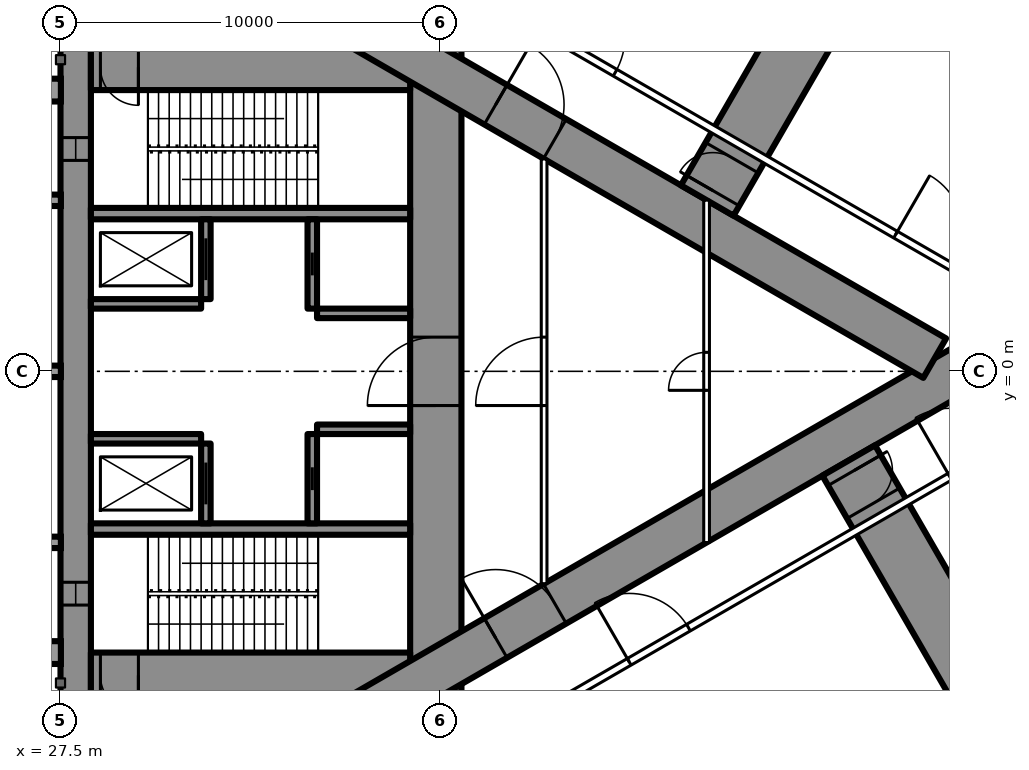
"""IFC4 building model, lengths in metres.
Left out: names, types, materials, properties, quantities, classifications, styles, units other than length and angle.
Written with IfcOpenShell. Run it as: python <this file> out.ifc"""

import sys

from ifc_helpers import new_model, si_unit, direction, frame, frame_2d, origin, place, context, subcontext, project, spatial, rectangle, extrude, element, fill, save


model = new_model("IFC4")
c1 = context("Model", 3, precision=1e-05, world=origin(), true_north=direction((0.0, 1.0)))
c2 = subcontext(c1, "Body", "Model", "MODEL_VIEW")
j1 = project(units=[si_unit("LENGTHUNIT", "METRE"), si_unit("PLANEANGLEUNIT", "RADIAN")], contexts=[c1])
p1 = place(None, origin())
s1 = spatial("IfcSite", under=j1, at=p1, CompositionType="ELEMENT")
p2 = place(p1, origin())
s2 = spatial("IfcBuilding", under=s1, at=p2, CompositionType="ELEMENT")
p3 = place(p2, frame((0.0, 0.0, 81.0)))
s3 = spatial("IfcBuildingStorey", under=s2, at=p3, CompositionType="ELEMENT", Elevation=81.0)
p4 = place(p3, frame((27.9, -8.6, 0.0), z_axis=(0.0, 0.0, 1.0), x_axis=(0.0, 1.0, 0.0)))
e1 = element("IfcWall", 1, at=p4, inside=s3, PredefinedType="SHEAR", context=c2, shape_type="SweptSolid", body=[
    extrude(rectangle(XDim=17.2, YDim=0.8, at=frame_2d((8.6, 0.0))), origin(), (0.0, 0.0, 1.0), 6.0),
])
p5 = place(p4, frame((2.45, 0.0, 0.6)))
e2 = element("IfcOpeningElement", 2, at=p5, cuts=e1, PredefinedType="OPENING", context=c2, shape_type="SweptSolid", body=[
    extrude(rectangle(XDim=0.6, YDim=4.5, at=frame_2d((0.3, 2.25))), frame((0.0, 0.41, 0.0), z_axis=(0.0, -1.0, 0.0), x_axis=(1.0, 0.0, 0.0)), (0.0, 0.0, 1.0), 0.82),
])
p6 = place(p4, frame((14.15, 0.0, 0.6)))
e3 = element("IfcOpeningElement", 3, at=p6, cuts=e1, PredefinedType="OPENING", context=c2, shape_type="SweptSolid", body=[
    extrude(rectangle(XDim=0.6, YDim=4.5, at=frame_2d((0.3, 2.25))), frame((0.0, 0.41, 0.0), z_axis=(0.0, -1.0, 0.0), x_axis=(1.0, 0.0, 0.0)), (0.0, 0.0, 1.0), 0.82),
])
p7 = place(p3, frame((37.375, -8.6, 0.0), z_axis=(0.0, 0.0, 1.0), x_axis=(0.0, 1.0, 0.0)))
e4 = element("IfcWall", 4, at=p7, inside=s3, PredefinedType="SHEAR", context=c2, shape_type="SweptSolid", body=[
    extrude(rectangle(XDim=17.2, YDim=1.35, at=frame_2d((8.6, 0.0))), origin(), (0.0, 0.0, 1.0), 6.0),
])
p8 = place(p7, frame((7.7, 0.0, 0.0)))
e5 = element("IfcOpeningElement", 5, at=p8, cuts=e4, PredefinedType="OPENING", context=c2, shape_type="SweptSolid", body=[
    extrude(rectangle(XDim=1.8, YDim=2.2, at=frame_2d((0.9, 1.1))), frame((0.0, 0.685, 0.0), z_axis=(0.0, -1.0, 0.0), x_axis=(1.0, 0.0, 0.0)), (0.0, 0.0, 1.0), 1.37),
])
p9 = place(p3, frame((28.3, -8.0, 0.0), z_axis=(0.0, 0.0, 1.0), x_axis=(1.0, 0.0, 0.0)))
e6 = element("IfcWall", 6, at=p9, inside=s3, PredefinedType="SHEAR", context=c2, shape_type="SweptSolid", body=[
    extrude(rectangle(XDim=8.4, YDim=1.2, at=frame_2d((4.2, 0.0))), origin(), (0.0, 0.0, 1.0), 6.0),
])
p10 = place(p9, frame((0.25, 0.0, 0.0)))
e7 = element("IfcOpeningElement", 7, at=p10, cuts=e6, PredefinedType="OPENING", context=c2, shape_type="SweptSolid", body=[
    extrude(rectangle(XDim=1.0, YDim=2.2, at=frame_2d((0.5, 1.1))), frame((0.0, 0.61, 0.0), z_axis=(0.0, -1.0, 0.0), x_axis=(1.0, 0.0, 0.0)), (0.0, 0.0, 1.0), 1.22),
])
p11 = place(p3, frame((28.3, 8.0, 0.0), z_axis=(0.0, 0.0, 1.0), x_axis=(1.0, 0.0, 0.0)))
e8 = element("IfcWall", 8, at=p11, inside=s3, PredefinedType="SHEAR", context=c2, shape_type="SweptSolid", body=[
    extrude(rectangle(XDim=8.4, YDim=1.2, at=frame_2d((4.2, 0.0))), origin(), (0.0, 0.0, 1.0), 6.0),
])
p12 = place(p11, frame((0.25, 0.0, 0.0)))
e9 = element("IfcOpeningElement", 9, at=p12, cuts=e8, PredefinedType="OPENING", context=c2, shape_type="SweptSolid", body=[
    extrude(rectangle(XDim=1.0, YDim=2.2, at=frame_2d((0.5, 1.1))), frame((0.0, 0.61, 0.0), z_axis=(0.0, -1.0, 0.0), x_axis=(1.0, 0.0, 0.0)), (0.0, 0.0, 1.0), 1.22),
])
for number, where, z_axis, x_axis in (
    (10, (28.3, -4.15, 0.0), (0.0, 0.0, 1.0), (1.0, 0.0, 0.0)),
    (11, (28.3, 4.15, 0.0), (0.0, 0.0, 1.0), (1.0, 0.0, 0.0)),
):
    element("IfcWall", number, at=place(p3, frame(where, z_axis=z_axis, x_axis=x_axis)), inside=s3, PredefinedType="SHEAR", context=c2, shape_type="SweptSolid", body=[
        extrude(rectangle(XDim=8.4, YDim=0.3, at=frame_2d((4.2, 0.0))), origin(), (0.0, 0.0, 1.0), 6.0),
    ])
p13 = place(p3, frame((31.325, -4.0, 0.0), z_axis=(0.0, 0.0, 1.0), x_axis=(0.0, 1.0, 0.0)))
e12 = element("IfcWall", 12, at=p13, inside=s3, PredefinedType="SHEAR", context=c2, shape_type="SweptSolid", body=[
    extrude(rectangle(XDim=2.1, YDim=0.25, at=frame_2d((1.05, 0.0))), origin(), (0.0, 0.0, 1.0), 6.0),
])
p14 = place(p13, frame((0.5, 0.0, 0.0)))
e13 = element("IfcOpeningElement", 13, at=p14, cuts=e12, PredefinedType="OPENING", context=c2, shape_type="SweptSolid", body=[
    extrude(rectangle(XDim=1.1, YDim=2.2, at=frame_2d((0.55, 1.1))), frame((0.0, 0.135, 0.0), z_axis=(0.0, -1.0, 0.0), x_axis=(1.0, 0.0, 0.0)), (0.0, 0.0, 1.0), 0.27),
])
p15 = place(p3, frame((34.125, -4.0, 0.0), z_axis=(0.0, 0.0, 1.0), x_axis=(0.0, 1.0, 0.0)))
e14 = element("IfcWall", 14, at=p15, inside=s3, PredefinedType="SHEAR", context=c2, shape_type="SweptSolid", body=[
    extrude(rectangle(XDim=2.35, YDim=0.25, at=frame_2d((1.175, 0.0))), origin(), (0.0, 0.0, 1.0), 6.0),
])
p16 = place(p15, frame((0.875, 0.0, 0.0)))
e15 = element("IfcOpeningElement", 15, at=p16, cuts=e14, PredefinedType="OPENING", context=c2, shape_type="SweptSolid", body=[
    extrude(rectangle(XDim=0.6, YDim=2.0, at=frame_2d((0.3, 1.0))), frame((0.0, 0.135, 0.0), z_axis=(0.0, -1.0, 0.0), x_axis=(1.0, 0.0, 0.0)), (0.0, 0.0, 1.0), 0.27),
])
p17 = place(p3, frame((28.3, -1.775, 0.0), z_axis=(0.0, 0.0, 1.0), x_axis=(1.0, 0.0, 0.0)))
e16 = element("IfcWall", 16, at=p17, inside=s3, PredefinedType="SHEAR", context=c2, shape_type="SweptSolid", body=[
    extrude(rectangle(XDim=2.9, YDim=0.25, at=frame_2d((1.45, 0.0))), origin(), (0.0, 0.0, 1.0), 6.0),
])
p18 = place(p3, frame((34.25, -1.525, 0.0), z_axis=(0.0, 0.0, 1.0), x_axis=(1.0, 0.0, 0.0)))
e17 = element("IfcWall", 17, at=p18, inside=s3, PredefinedType="SHEAR", context=c2, shape_type="SweptSolid", body=[
    extrude(rectangle(XDim=2.45, YDim=0.25, at=frame_2d((1.225, 0.0))), origin(), (0.0, 0.0, 1.0), 6.0),
])
p19 = place(p3, frame((31.325, 1.9, 0.0), z_axis=(0.0, 0.0, 1.0), x_axis=(0.0, 1.0, 0.0)))
e18 = element("IfcWall", 18, at=p19, inside=s3, PredefinedType="SHEAR", context=c2, shape_type="SweptSolid", body=[
    extrude(rectangle(XDim=2.1, YDim=0.25, at=frame_2d((1.05, 0.0))), origin(), (0.0, 0.0, 1.0), 6.0),
])
p20 = place(p19, frame((0.5, 0.0, 0.0)))
e19 = element("IfcOpeningElement", 19, at=p20, cuts=e18, PredefinedType="OPENING", context=c2, shape_type="SweptSolid", body=[
    extrude(rectangle(XDim=1.1, YDim=2.2, at=frame_2d((0.55, 1.1))), frame((0.0, 0.135, 0.0), z_axis=(0.0, -1.0, 0.0), x_axis=(1.0, 0.0, 0.0)), (0.0, 0.0, 1.0), 0.27),
])
p21 = place(p3, frame((34.125, 1.65, 0.0), z_axis=(0.0, 0.0, 1.0), x_axis=(0.0, 1.0, 0.0)))
e20 = element("IfcWall", 20, at=p21, inside=s3, PredefinedType="SHEAR", context=c2, shape_type="SweptSolid", body=[
    extrude(rectangle(XDim=2.35, YDim=0.25, at=frame_2d((1.175, 0.0))), origin(), (0.0, 0.0, 1.0), 6.0),
])
p22 = place(p21, frame((0.875, 0.0, 0.0)))
e21 = element("IfcOpeningElement", 21, at=p22, cuts=e20, PredefinedType="OPENING", context=c2, shape_type="SweptSolid", body=[
    extrude(rectangle(XDim=0.6, YDim=2.0, at=frame_2d((0.3, 1.0))), frame((0.0, 0.135, 0.0), z_axis=(0.0, -1.0, 0.0), x_axis=(1.0, 0.0, 0.0)), (0.0, 0.0, 1.0), 0.27),
])
p23 = place(p3, frame((28.3, 1.775, 0.0), z_axis=(0.0, 0.0, 1.0), x_axis=(1.0, 0.0, 0.0)))
e22 = element("IfcWall", 22, at=p23, inside=s3, PredefinedType="SHEAR", context=c2, shape_type="SweptSolid", body=[
    extrude(rectangle(XDim=2.9, YDim=0.25, at=frame_2d((1.45, 0.0))), origin(), (0.0, 0.0, 1.0), 6.0),
])
p24 = place(p3, frame((34.25, 1.525, 0.0), z_axis=(0.0, 0.0, 1.0), x_axis=(1.0, 0.0, 0.0)))
e23 = element("IfcWall", 23, at=p24, inside=s3, PredefinedType="SHEAR", context=c2, shape_type="SweptSolid", body=[
    extrude(rectangle(XDim=2.45, YDim=0.25, at=frame_2d((1.225, 0.0))), origin(), (0.0, 0.0, 1.0), 6.0),
])
p25 = place(p3, frame((27.2, -13.8, 0.0), z_axis=(0.0, 0.0, 1.0), x_axis=(0.866027159892, 0.499996958321, 0.0)))
e24 = element("IfcWall", 24, at=p25, inside=s3, PredefinedType="SHEAR", context=c2, shape_type="SweptSolid", body=[
    extrude(rectangle(XDim=27.947, YDim=1.2, at=frame_2d((13.973, 0.0))), origin(), (0.0, 0.0, 1.0), 6.0),
])
p26 = place(p25, frame((4.6, 0.0, 0.0)))
e25 = element("IfcOpeningElement", 25, at=p26, cuts=e24, PredefinedType="OPENING", context=c2, shape_type="SweptSolid", body=[
    extrude(rectangle(XDim=1.0, YDim=2.2, at=frame_2d((0.5, 1.1))), frame((0.0, 0.61, 0.0), z_axis=(0.0, -1.0, 0.0), x_axis=(1.0, 0.0, 0.0)), (0.0, 0.0, 1.0), 1.22),
])
p27 = place(p25, frame((13.568, 0.0, 0.0)))
e26 = element("IfcOpeningElement", 26, at=p27, cuts=e24, PredefinedType="OPENING", context=c2, shape_type="SweptSolid", body=[
    extrude(rectangle(XDim=1.8, YDim=2.2, at=frame_2d((0.9, 1.1))), frame((0.0, 0.61, 0.0), z_axis=(0.0, -1.0, 0.0), x_axis=(1.0, 0.0, 0.0)), (0.0, 0.0, 1.0), 1.22),
])
p28 = place(p3, frame((27.2, 13.8, 0.0), z_axis=(0.0, 0.0, 1.0), x_axis=(0.866024515034, -0.500001539357, 0.0)))
e27 = element("IfcWall", 27, at=p28, inside=s3, PredefinedType="SHEAR", context=c2, shape_type="SweptSolid", body=[
    extrude(rectangle(XDim=26.907, YDim=1.2, at=frame_2d((13.454, 0.0))), origin(), (0.0, 0.0, 1.0), 6.0),
])
p29 = place(p28, frame((4.6, 0.0, 0.0)))
e28 = element("IfcOpeningElement", 28, at=p29, cuts=e27, PredefinedType="OPENING", context=c2, shape_type="SweptSolid", body=[
    extrude(rectangle(XDim=1.0, YDim=2.2, at=frame_2d((0.5, 1.1))), frame((0.0, 0.61, 0.0), z_axis=(0.0, -1.0, 0.0), x_axis=(1.0, 0.0, 0.0)), (0.0, 0.0, 1.0), 1.22),
])
p30 = place(p28, frame((13.568, 0.0, 0.0)))
e29 = element("IfcOpeningElement", 29, at=p30, cuts=e27, PredefinedType="OPENING", context=c2, shape_type="SweptSolid", body=[
    extrude(rectangle(XDim=1.8, YDim=2.2, at=frame_2d((0.9, 1.1))), frame((0.0, 0.61, 0.0), z_axis=(0.0, -1.0, 0.0), x_axis=(1.0, 0.0, 0.0)), (0.0, 0.0, 1.0), 1.22),
])
p31 = place(p3, frame((48.239, -2.346, 0.0), z_axis=(0.0, 0.0, 1.0), x_axis=(0.500006130383, -0.866021864377, 0.0)))
e30 = element("IfcWall", 30, at=p31, inside=s3, PredefinedType="SHEAR", context=c2, shape_type="SweptSolid", body=[
    extrude(rectangle(XDim=13.112, YDim=1.6, at=frame_2d((6.556, 0.0))), origin(), (0.0, 0.0, 1.0), 6.0),
])
p32 = place(p31, frame((0.3, 0.0, 0.0)))
e31 = element("IfcOpeningElement", 31, at=p32, cuts=e30, PredefinedType="OPENING", context=c2, shape_type="SweptSolid", body=[
    extrude(rectangle(XDim=1.0, YDim=2.2, at=frame_2d((0.5, 1.1))), frame((0.0, 0.81, 0.0), z_axis=(0.0, -1.0, 0.0), x_axis=(1.0, 0.0, 0.0)), (0.0, 0.0, 1.0), 1.62),
])
p33 = place(p3, frame((44.517, 4.495, 0.0), z_axis=(0.0, 0.0, 1.0), x_axis=(0.500003233568, 0.866023536875, 0.0)))
e32 = element("IfcWall", 32, at=p33, inside=s3, PredefinedType="SHEAR", context=c2, shape_type="SweptSolid", body=[
    extrude(rectangle(XDim=13.122, YDim=1.6, at=frame_2d((6.561, 0.0))), origin(), (0.0, 0.0, 1.0), 6.0),
])
p34 = place(p33, frame((0.3, 0.0, 0.0)))
e33 = element("IfcOpeningElement", 33, at=p34, cuts=e32, PredefinedType="OPENING", context=c2, shape_type="SweptSolid", body=[
    extrude(rectangle(XDim=1.0, YDim=2.2, at=frame_2d((0.5, 1.1))), frame((0.0, 0.81, 0.0), z_axis=(0.0, -1.0, 0.0), x_axis=(1.0, 0.0, 0.0)), (0.0, 0.0, 1.0), 1.62),
])
p35 = place(p3, frame((37.96, -10.243, 0.0), z_axis=(0.0, 0.0, 1.0), x_axis=(0.866026429433, 0.499998223521, 0.0)))
e34 = element("IfcWall", 34, at=p35, inside=s3, PredefinedType="PARTITIONING", context=c2, shape_type="SweptSolid", body=[
    extrude(rectangle(XDim=20.487, YDim=0.2, at=frame_2d((10.243, 0.0))), origin(), (0.0, 0.0, 1.0), 5.75),
])
p36 = place(p35, frame((14.943, 0.0, 0.0)))
e35 = element("IfcOpeningElement", 35, at=p36, cuts=e34, PredefinedType="OPENING", context=c2, shape_type="SweptSolid", body=[
    extrude(rectangle(XDim=1.8, YDim=2.2, at=frame_2d((0.9, 1.1))), frame((0.0, 0.11, 0.0), z_axis=(0.0, -1.0, 0.0), x_axis=(1.0, 0.0, 0.0)), (0.0, 0.0, 1.0), 0.22),
])
p37 = place(p35, frame((5.2, 0.0, 0.0)))
e36 = element("IfcOpeningElement", 36, at=p37, cuts=e34, PredefinedType="OPENING", context=c2, shape_type="SweptSolid", body=[
    extrude(rectangle(XDim=1.8, YDim=2.2, at=frame_2d((0.9, 1.1))), frame((0.0, 0.11, 0.0), z_axis=(0.0, -1.0, 0.0), x_axis=(1.0, 0.0, 0.0)), (0.0, 0.0, 1.0), 0.22),
])
p38 = place(p3, frame((36.834, 10.894, 0.0), z_axis=(0.0, 0.0, 1.0), x_axis=(0.866028157229, -0.499995230863, 0.0)))
e37 = element("IfcWall", 37, at=p38, inside=s3, PredefinedType="PARTITIONING", context=c2, shape_type="SweptSolid", body=[
    extrude(rectangle(XDim=21.667, YDim=0.2, at=frame_2d((10.833, 0.0))), origin(), (0.0, 0.0, 1.0), 5.75),
])
p39 = place(p38, frame((14.594, 0.0, 0.0)))
e38 = element("IfcOpeningElement", 38, at=p39, cuts=e37, PredefinedType="OPENING", context=c2, shape_type="SweptSolid", body=[
    extrude(rectangle(XDim=1.8, YDim=2.2, at=frame_2d((0.9, 1.1))), frame((0.0, 0.11, 0.0), z_axis=(0.0, -1.0, 0.0), x_axis=(1.0, 0.0, 0.0)), (0.0, 0.0, 1.0), 0.22),
])
p40 = place(p38, frame((4.073, 0.0, 0.0)))
e39 = element("IfcOpeningElement", 39, at=p40, cuts=e37, PredefinedType="OPENING", context=c2, shape_type="SweptSolid", body=[
    extrude(rectangle(XDim=2.0, YDim=2.4, at=frame_2d((1.0, 1.2))), frame((0.0, 0.11, 0.0), z_axis=(0.0, -1.0, 0.0), x_axis=(1.0, 0.0, 0.0)), (0.0, 0.0, 1.0), 0.22),
])
p41 = place(p3, frame((40.225, -5.587, 0.0), z_axis=(0.0, 0.0, 1.0), x_axis=(0.0, 1.0, 0.0)))
e40 = element("IfcWall", 40, at=p41, inside=s3, PredefinedType="PARTITIONING", context=c2, shape_type="SweptSolid", body=[
    extrude(rectangle(XDim=11.174, YDim=0.15, at=frame_2d((5.587, 0.0))), origin(), (0.0, 0.0, 1.0), 5.75),
])
p42 = place(p41, frame((4.687, 0.0, 0.0)))
e41 = element("IfcOpeningElement", 41, at=p42, cuts=e40, PredefinedType="OPENING", context=c2, shape_type="SweptSolid", body=[
    extrude(rectangle(XDim=1.8, YDim=2.2, at=frame_2d((0.9, 1.1))), frame((0.0, 0.085, 0.0), z_axis=(0.0, -1.0, 0.0), x_axis=(1.0, 0.0, 0.0)), (0.0, 0.0, 1.0), 0.17),
])
p43 = place(p3, frame((44.5, -4.505, 0.0), z_axis=(0.0, 0.0, 1.0), x_axis=(0.0, 1.0, 0.0)))
e42 = element("IfcWall", 42, at=p43, inside=s3, PredefinedType="PARTITIONING", context=c2, shape_type="SweptSolid", body=[
    extrude(rectangle(XDim=9.009, YDim=0.15, at=frame_2d((4.505, 0.0))), origin(), (0.0, 0.0, 1.0), 5.75),
])
p44 = place(p43, frame((4.005, 0.0, 0.0)))
e43 = element("IfcOpeningElement", 43, at=p44, cuts=e42, PredefinedType="OPENING", context=c2, shape_type="SweptSolid", body=[
    extrude(rectangle(XDim=1.0, YDim=2.2, at=frame_2d((0.5, 1.1))), frame((0.0, 0.085, 0.0), z_axis=(0.0, -1.0, 0.0), x_axis=(1.0, 0.0, 0.0)), (0.0, 0.0, 1.0), 0.17),
])
p45 = place(p32, origin())
e44 = element("IfcDoor", 44, at=p45, inside=s3, OperationType="SINGLE_SWING_LEFT", PredefinedType="DOOR", context=c2, shape_type="SweptSolid", body=[
    extrude(rectangle(XDim=1.0, YDim=2.2, at=frame_2d((0.5, 1.1))), frame((0.0, 0.025, 0.0), z_axis=(0.0, -1.0, 0.0), x_axis=(1.0, 0.0, 0.0)), (0.0, 0.0, 1.0), 0.05),
])
fill(e31, e44)
p46 = place(p34, origin())
e45 = element("IfcDoor", 45, at=p46, inside=s3, OperationType="SINGLE_SWING_LEFT", PredefinedType="DOOR", context=c2, shape_type="SweptSolid", body=[
    extrude(rectangle(XDim=1.0, YDim=2.2, at=frame_2d((0.5, 1.1))), frame((0.0, 0.025, 0.0), z_axis=(0.0, -1.0, 0.0), x_axis=(1.0, 0.0, 0.0)), (0.0, 0.0, 1.0), 0.05),
])
fill(e33, e45)
p47 = place(p36, origin())
e46 = element("IfcDoor", 46, at=p47, inside=s3, OperationType="DOUBLE_DOOR_SINGLE_SWING", PredefinedType="DOOR", context=c2, shape_type="SweptSolid", body=[
    extrude(rectangle(XDim=1.8, YDim=2.2, at=frame_2d((0.9, 1.1))), frame((0.0, 0.025, 0.0), z_axis=(0.0, -1.0, 0.0), x_axis=(1.0, 0.0, 0.0)), (0.0, 0.0, 1.0), 0.05),
])
fill(e35, e46)
p48 = place(p39, origin())
e47 = element("IfcDoor", 47, at=p48, inside=s3, OperationType="DOUBLE_DOOR_SINGLE_SWING", PredefinedType="DOOR", context=c2, shape_type="SweptSolid", body=[
    extrude(rectangle(XDim=1.8, YDim=2.2, at=frame_2d((0.9, 1.1))), frame((0.0, 0.025, 0.0), z_axis=(0.0, -1.0, 0.0), x_axis=(1.0, 0.0, 0.0)), (0.0, 0.0, 1.0), 0.05),
])
fill(e38, e47)
p49 = place(p40, origin())
e48 = element("IfcDoor", 48, at=p49, inside=s3, OperationType="DOUBLE_DOOR_SINGLE_SWING", PredefinedType="DOOR", context=c2, shape_type="SweptSolid", body=[
    extrude(rectangle(XDim=2.0, YDim=2.4, at=frame_2d((1.0, 1.2))), frame((0.0, 0.025, 0.0), z_axis=(0.0, -1.0, 0.0), x_axis=(1.0, 0.0, 0.0)), (0.0, 0.0, 1.0), 0.05),
])
fill(e39, e48)
p50 = place(p37, origin())
e49 = element("IfcDoor", 49, at=p50, inside=s3, OperationType="DOUBLE_DOOR_SINGLE_SWING", PredefinedType="DOOR", context=c2, shape_type="SweptSolid", body=[
    extrude(rectangle(XDim=1.8, YDim=2.2, at=frame_2d((0.9, 1.1))), frame((0.0, 0.025, 0.0), z_axis=(0.0, -1.0, 0.0), x_axis=(1.0, 0.0, 0.0)), (0.0, 0.0, 1.0), 0.05),
])
fill(e36, e49)
p51 = place(p42, origin())
e50 = element("IfcDoor", 50, at=p51, inside=s3, OperationType="DOUBLE_DOOR_SINGLE_SWING", PredefinedType="DOOR", context=c2, shape_type="SweptSolid", body=[
    extrude(rectangle(XDim=1.8, YDim=2.2, at=frame_2d((0.9, 1.1))), frame((0.0, 0.025, 0.0), z_axis=(0.0, -1.0, 0.0), x_axis=(1.0, 0.0, 0.0)), (0.0, 0.0, 1.0), 0.05),
])
fill(e41, e50)
p52 = place(p44, origin())
e51 = element("IfcDoor", 51, at=p52, inside=s3, OperationType="SINGLE_SWING_LEFT", PredefinedType="DOOR", context=c2, shape_type="SweptSolid", body=[
    extrude(rectangle(XDim=1.0, YDim=2.2, at=frame_2d((0.5, 1.1))), frame((0.0, 0.025, 0.0), z_axis=(0.0, -1.0, 0.0), x_axis=(1.0, 0.0, 0.0)), (0.0, 0.0, 1.0), 0.05),
])
fill(e43, e51)
p53 = place(p27, origin())
e52 = element("IfcDoor", 52, at=p53, inside=s3, OperationType="DOUBLE_DOOR_SINGLE_SWING", PredefinedType="DOOR", context=c2, shape_type="SweptSolid", body=[
    extrude(rectangle(XDim=1.8, YDim=2.2, at=frame_2d((0.9, 1.1))), frame((0.0, 0.025, 0.0), z_axis=(0.0, -1.0, 0.0), x_axis=(1.0, 0.0, 0.0)), (0.0, 0.0, 1.0), 0.05),
])
fill(e26, e52)
p54 = place(p30, origin())
e53 = element("IfcDoor", 53, at=p54, inside=s3, OperationType="DOUBLE_DOOR_SINGLE_SWING", PredefinedType="DOOR", context=c2, shape_type="SweptSolid", body=[
    extrude(rectangle(XDim=1.8, YDim=2.2, at=frame_2d((0.9, 1.1))), frame((0.0, 0.025, 0.0), z_axis=(0.0, -1.0, 0.0), x_axis=(1.0, 0.0, 0.0)), (0.0, 0.0, 1.0), 0.05),
])
fill(e29, e53)
p55 = place(p8, origin())
e54 = element("IfcDoor", 54, at=p55, inside=s3, OperationType="DOUBLE_DOOR_SINGLE_SWING", PredefinedType="DOOR", context=c2, shape_type="SweptSolid", body=[
    extrude(rectangle(XDim=1.8, YDim=2.2, at=frame_2d((0.9, 1.1))), frame((0.0, 0.025, 0.0), z_axis=(0.0, -1.0, 0.0), x_axis=(1.0, 0.0, 0.0)), (0.0, 0.0, 1.0), 0.05),
])
fill(e5, e54)
p56 = place(p10, origin())
e55 = element("IfcDoor", 55, at=p56, inside=s3, OperationType="SINGLE_SWING_RIGHT", PredefinedType="DOOR", context=c2, shape_type="SweptSolid", body=[
    extrude(rectangle(XDim=1.0, YDim=2.2, at=frame_2d((0.5, 1.1))), frame((0.0, 0.025, 0.0), z_axis=(0.0, -1.0, 0.0), x_axis=(1.0, 0.0, 0.0)), (0.0, 0.0, 1.0), 0.05),
])
fill(e7, e55)
p57 = place(p12, origin())
e56 = element("IfcDoor", 56, at=p57, inside=s3, OperationType="SINGLE_SWING_RIGHT", PredefinedType="DOOR", context=c2, shape_type="SweptSolid", body=[
    extrude(rectangle(XDim=1.0, YDim=2.2, at=frame_2d((0.5, 1.1))), frame((0.0, 0.025, 0.0), z_axis=(0.0, -1.0, 0.0), x_axis=(1.0, 0.0, 0.0)), (0.0, 0.0, 1.0), 0.05),
])
fill(e9, e56)
p58 = place(p14, origin())
e57 = element("IfcDoor", 57, at=p58, inside=s3, OperationType="SLIDING_TO_LEFT", PredefinedType="USERDEFINED", context=c2, shape_type="SweptSolid", body=[
    extrude(rectangle(XDim=1.1, YDim=2.2, at=frame_2d((0.55, 1.1))), frame((0.0, 0.025, 0.0), z_axis=(0.0, -1.0, 0.0), x_axis=(1.0, 0.0, 0.0)), (0.0, 0.0, 1.0), 0.05),
])
fill(e13, e57)
p59 = place(p20, origin())
e58 = element("IfcDoor", 58, at=p59, inside=s3, OperationType="SLIDING_TO_LEFT", PredefinedType="USERDEFINED", context=c2, shape_type="SweptSolid", body=[
    extrude(rectangle(XDim=1.1, YDim=2.2, at=frame_2d((0.55, 1.1))), frame((0.0, 0.025, 0.0), z_axis=(0.0, -1.0, 0.0), x_axis=(1.0, 0.0, 0.0)), (0.0, 0.0, 1.0), 0.05),
])
fill(e19, e58)
p60 = place(p16, origin())
e59 = element("IfcDoor", 59, at=p60, inside=s3, OperationType="SLIDING_TO_LEFT", PredefinedType="DOOR", context=c2, shape_type="SweptSolid", body=[
    extrude(rectangle(XDim=0.6, YDim=2.0, at=frame_2d((0.3, 1.0))), frame((0.0, 0.025, 0.0), z_axis=(0.0, -1.0, 0.0), x_axis=(1.0, 0.0, 0.0)), (0.0, 0.0, 1.0), 0.05),
])
fill(e15, e59)
p61 = place(p22, origin())
e60 = element("IfcDoor", 60, at=p61, inside=s3, OperationType="SLIDING_TO_LEFT", PredefinedType="DOOR", context=c2, shape_type="SweptSolid", body=[
    extrude(rectangle(XDim=0.6, YDim=2.0, at=frame_2d((0.3, 1.0))), frame((0.0, 0.025, 0.0), z_axis=(0.0, -1.0, 0.0), x_axis=(1.0, 0.0, 0.0)), (0.0, 0.0, 1.0), 0.05),
])
fill(e21, e60)
p62 = place(p5, origin())
e61 = element("IfcWindow", 61, at=p62, inside=s3, PartitioningType="SINGLE_PANEL", PredefinedType="WINDOW", context=c2, shape_type="SweptSolid", body=[
    extrude(rectangle(XDim=0.6, YDim=4.5, at=frame_2d((0.3, 2.25))), frame((0.0, 0.03, 0.0), z_axis=(0.0, -1.0, 0.0), x_axis=(1.0, 0.0, 0.0)), (0.0, 0.0, 1.0), 0.06),
])
fill(e2, e61)
p63 = place(p6, origin())
e62 = element("IfcWindow", 62, at=p63, inside=s3, PartitioningType="SINGLE_PANEL", PredefinedType="WINDOW", context=c2, shape_type="SweptSolid", body=[
    extrude(rectangle(XDim=0.6, YDim=4.5, at=frame_2d((0.3, 2.25))), frame((0.0, 0.03, 0.0), z_axis=(0.0, -1.0, 0.0), x_axis=(1.0, 0.0, 0.0)), (0.0, 0.0, 1.0), 0.06),
])
fill(e3, e62)
save(model, sys.argv[1])
